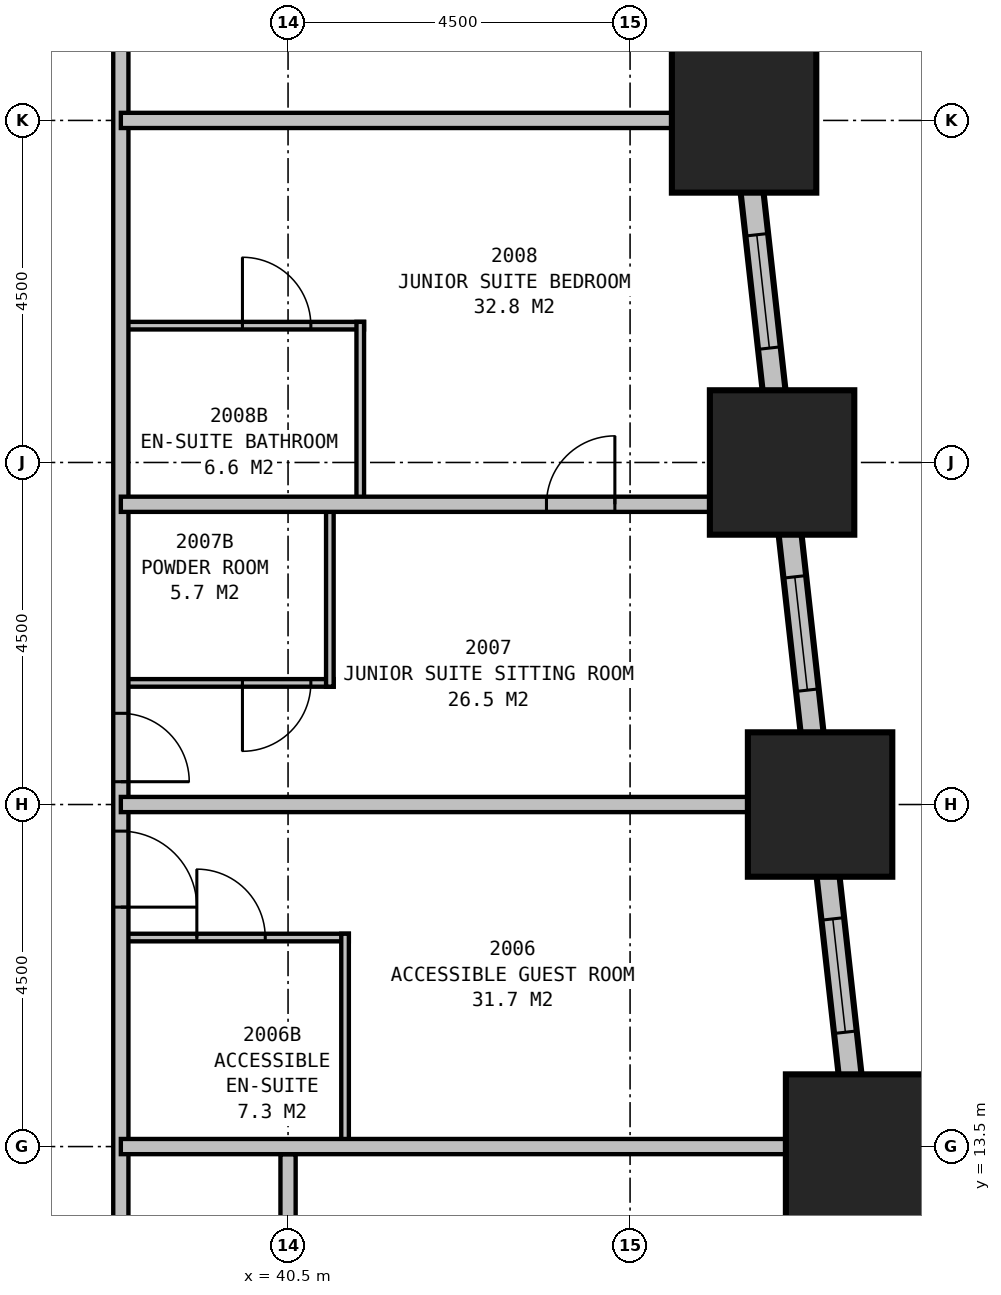
"""IFC4 building model, lengths in metres.
Left out: names, types, materials, properties, quantities, classifications, styles, units other than length and angle.
Written with IfcOpenShell. Run it as: python <this file> out.ifc"""

import sys

from ifc_helpers import new_model, si_unit, direction, frame, frame_2d, origin, origin_2d, place, context, subcontext, project, spatial, rectangle, extrude, element, fill, save


model = new_model("IFC4")
c1 = context("Model", 3, precision=1e-05, world=origin(), true_north=direction((0.0, 1.0)))
c2 = subcontext(c1, "Body", "Model", "MODEL_VIEW")
j1 = project(units=[si_unit("LENGTHUNIT", "METRE"), si_unit("PLANEANGLEUNIT", "RADIAN")], contexts=[c1])
p1 = place(None, origin())
s1 = spatial("IfcSite", under=j1, at=p1, CompositionType="ELEMENT")
p2 = place(p1, origin())
s2 = spatial("IfcBuilding", under=s1, at=p2, CompositionType="ELEMENT")
p3 = place(p2, frame((0.0, 0.0, 82.2)))
s3 = spatial("IfcBuildingStorey", under=s2, at=p3, CompositionType="ELEMENT", Elevation=82.2)
for number, where, z_axis, x_axis in (
    (1, (48.0, 13.5, 0.0), (0.0, 0.0, 1.0), (1.0, 0.0, 0.0)),
    (2, (47.5, 18.0, 0.0), (0.0, 0.0, 1.0), (1.0, 0.0, 0.0)),
    (3, (47.0, 22.5, 0.0), (0.0, 0.0, 1.0), (1.0, 0.0, 0.0)),
    (4, (46.5, 27.0, 0.0), (0.0, 0.0, 1.0), (1.0, 0.0, 0.0)),
):
    element("IfcColumn", number, at=place(p3, frame(where, z_axis=z_axis, x_axis=x_axis)), inside=s3, PredefinedType="COLUMN", context=c2, shape_type="SweptSolid", body=[
        extrude(rectangle(XDim=1.9, YDim=1.9, at=origin_2d()), origin(), (0.0, 0.0, 1.0), 3.5),
    ])
p4 = place(p3, frame((49.017, 4.351, 0.0), z_axis=(0.0, 0.0, 1.0), x_axis=(-0.110433201132, 0.993883548555, 0.0)))
e5 = element("IfcWall", 5, at=p4, inside=s3, PredefinedType="STANDARD", context=c2, shape_type="SweptSolid", body=[
    extrude(rectangle(XDim=31.994, YDim=0.3, at=frame_2d((15.997, 0.0))), origin(), (0.0, 0.0, 1.0), 2.1),
])
p5 = place(p4, frame((1.664, 0.0, 0.5)))
e6 = element("IfcOpeningElement", 6, at=p5, cuts=e5, PredefinedType="OPENING", context=c2, shape_type="SweptSolid", body=[
    extrude(rectangle(XDim=1.5, YDim=1.4, at=frame_2d((0.75, 0.7))), frame((0.0, 0.16, 0.0), z_axis=(0.0, -1.0, 0.0), x_axis=(1.0, 0.0, 0.0)), (0.0, 0.0, 1.0), 0.32),
])
p6 = place(p4, frame((6.192, 0.0, 0.5)))
e7 = element("IfcOpeningElement", 7, at=p6, cuts=e5, PredefinedType="OPENING", context=c2, shape_type="SweptSolid", body=[
    extrude(rectangle(XDim=1.5, YDim=1.4, at=frame_2d((0.75, 0.7))), frame((0.0, 0.16, 0.0), z_axis=(0.0, -1.0, 0.0), x_axis=(1.0, 0.0, 0.0)), (0.0, 0.0, 1.0), 0.32),
])
p7 = place(p4, frame((10.719, 0.0, 0.5)))
e8 = element("IfcOpeningElement", 8, at=p7, cuts=e5, PredefinedType="OPENING", context=c2, shape_type="SweptSolid", body=[
    extrude(rectangle(XDim=1.5, YDim=1.4, at=frame_2d((0.75, 0.7))), frame((0.0, 0.16, 0.0), z_axis=(0.0, -1.0, 0.0), x_axis=(1.0, 0.0, 0.0)), (0.0, 0.0, 1.0), 0.32),
])
p8 = place(p4, frame((15.247, 0.0, 0.5)))
e9 = element("IfcOpeningElement", 9, at=p8, cuts=e5, PredefinedType="OPENING", context=c2, shape_type="SweptSolid", body=[
    extrude(rectangle(XDim=1.5, YDim=1.4, at=frame_2d((0.75, 0.7))), frame((0.0, 0.16, 0.0), z_axis=(0.0, -1.0, 0.0), x_axis=(1.0, 0.0, 0.0)), (0.0, 0.0, 1.0), 0.32),
])
p9 = place(p4, frame((19.775, 0.0, 0.5)))
e10 = element("IfcOpeningElement", 10, at=p9, cuts=e5, PredefinedType="OPENING", context=c2, shape_type="SweptSolid", body=[
    extrude(rectangle(XDim=1.5, YDim=1.4, at=frame_2d((0.75, 0.7))), frame((0.0, 0.16, 0.0), z_axis=(0.0, -1.0, 0.0), x_axis=(1.0, 0.0, 0.0)), (0.0, 0.0, 1.0), 0.32),
])
p10 = place(p4, frame((24.302, 0.0, 0.5)))
e11 = element("IfcOpeningElement", 11, at=p10, cuts=e5, PredefinedType="OPENING", context=c2, shape_type="SweptSolid", body=[
    extrude(rectangle(XDim=1.5, YDim=1.4, at=frame_2d((0.75, 0.7))), frame((0.0, 0.16, 0.0), z_axis=(0.0, -1.0, 0.0), x_axis=(1.0, 0.0, 0.0)), (0.0, 0.0, 1.0), 0.32),
])
p11 = place(p4, frame((28.83, 0.0, 0.5)))
e12 = element("IfcOpeningElement", 12, at=p11, cuts=e5, PredefinedType="OPENING", context=c2, shape_type="SweptSolid", body=[
    extrude(rectangle(XDim=1.5, YDim=1.4, at=frame_2d((0.75, 0.7))), frame((0.0, 0.16, 0.0), z_axis=(0.0, -1.0, 0.0), x_axis=(1.0, 0.0, 0.0)), (0.0, 0.0, 1.0), 0.32),
])
p12 = place(p3, frame((38.3, 11.2, 0.0), z_axis=(0.0, 0.0, 1.0), x_axis=(0.0, 1.0, 0.0)))
e13 = element("IfcWall", 13, at=p12, inside=s3, PredefinedType="PARTITIONING", context=c2, shape_type="SweptSolid", body=[
    extrude(rectangle(XDim=18.7, YDim=0.2, at=frame_2d((9.35, 0.0))), origin(), (0.0, 0.0, 1.0), 3.25),
])
p13 = place(p12, frame((6.45, 0.0, 0.0), z_axis=(0.0, 0.0, 1.0), x_axis=(-1.0, 0.0, 0.0)))
e14 = element("IfcOpeningElement", 14, at=p13, cuts=e13, PredefinedType="OPENING", context=c2, shape_type="SweptSolid", body=[
    extrude(rectangle(XDim=1.0, YDim=2.1, at=frame_2d((0.5, 1.05))), frame((0.0, 0.11, 0.0), z_axis=(0.0, -1.0, 0.0), x_axis=(1.0, 0.0, 0.0)), (0.0, 0.0, 1.0), 0.22),
])
p14 = place(p12, frame((8.0, 0.0, 0.0), z_axis=(0.0, 0.0, 1.0), x_axis=(-1.0, 0.0, 0.0)))
e15 = element("IfcOpeningElement", 15, at=p14, cuts=e13, PredefinedType="OPENING", context=c2, shape_type="SweptSolid", body=[
    extrude(rectangle(XDim=0.9, YDim=2.1, at=frame_2d((0.45, 1.05))), frame((0.0, 0.11, 0.0), z_axis=(0.0, -1.0, 0.0), x_axis=(1.0, 0.0, 0.0)), (0.0, 0.0, 1.0), 0.22),
])
p15 = place(p3, frame((38.3, 18.0, 0.0), z_axis=(0.0, 0.0, 1.0), x_axis=(1.0, 0.0, 0.0)))
e16 = element("IfcWall", 16, at=p15, inside=s3, PredefinedType="PARTITIONING", context=c2, shape_type="SweptSolid", body=[
    extrude(rectangle(XDim=9.199, YDim=0.2, at=frame_2d((4.6, 0.0))), origin(), (0.0, 0.0, 1.0), 2.2),
])
p16 = place(p3, frame((38.3, 21.95, 0.0), z_axis=(0.0, 0.0, 1.0), x_axis=(1.0, 0.0, 0.0)))
e17 = element("IfcWall", 17, at=p16, inside=s3, PredefinedType="PARTITIONING", context=c2, shape_type="SweptSolid", body=[
    extrude(rectangle(XDim=8.76, YDim=0.2, at=frame_2d((4.38, 0.0))), origin(), (0.0, 0.0, 1.0), 3.25),
])
p17 = place(p16, frame((5.6, 0.0, 0.0)))
e18 = element("IfcOpeningElement", 18, at=p17, cuts=e17, PredefinedType="OPENING", context=c2, shape_type="SweptSolid", body=[
    extrude(rectangle(XDim=0.9, YDim=2.1, at=frame_2d((0.45, 1.05))), frame((0.0, 0.11, 0.0), z_axis=(0.0, -1.0, 0.0), x_axis=(1.0, 0.0, 0.0)), (0.0, 0.0, 1.0), 0.22),
])
p18 = place(p3, frame((41.25, 13.5, 0.0), z_axis=(0.0, 0.0, 1.0), x_axis=(0.0, 1.0, 0.0)))
e19 = element("IfcWall", 19, at=p18, inside=s3, PredefinedType="PLUMBINGWALL", context=c2, shape_type="SweptSolid", body=[
    extrude(rectangle(XDim=2.8, YDim=0.1, at=frame_2d((1.4, 0.0))), origin(), (0.0, 0.0, 1.0), 3.25),
])
p19 = place(p3, frame((38.3, 16.25, 0.0), z_axis=(0.0, 0.0, 1.0), x_axis=(1.0, 0.0, 0.0)))
e20 = element("IfcWall", 20, at=p19, inside=s3, PredefinedType="PLUMBINGWALL", context=c2, shape_type="SweptSolid", body=[
    extrude(rectangle(XDim=3.0, YDim=0.1, at=frame_2d((1.5, 0.0))), origin(), (0.0, 0.0, 1.0), 3.25),
])
p20 = place(p19, frame((1.0, 0.0, 0.0)))
e21 = element("IfcOpeningElement", 21, at=p20, cuts=e20, PredefinedType="OPENING", context=c2, shape_type="SweptSolid", body=[
    extrude(rectangle(XDim=0.9, YDim=2.1, at=frame_2d((0.45, 1.05))), frame((0.0, 0.06, 0.0), z_axis=(0.0, -1.0, 0.0), x_axis=(1.0, 0.0, 0.0)), (0.0, 0.0, 1.0), 0.12),
])
p21 = place(p3, frame((41.05, 19.55, 0.0), z_axis=(0.0, 0.0, 1.0), x_axis=(0.0, 1.0, 0.0)))
e22 = element("IfcWall", 22, at=p21, inside=s3, PredefinedType="PLUMBINGWALL", context=c2, shape_type="SweptSolid", body=[
    extrude(rectangle(XDim=2.4, YDim=0.1, at=frame_2d((1.2, 0.0))), origin(), (0.0, 0.0, 1.0), 3.25),
])
p22 = place(p3, frame((38.3, 19.6, 0.0), z_axis=(0.0, 0.0, 1.0), x_axis=(1.0, 0.0, 0.0)))
e23 = element("IfcWall", 23, at=p22, inside=s3, PredefinedType="PLUMBINGWALL", context=c2, shape_type="SweptSolid", body=[
    extrude(rectangle(XDim=2.8, YDim=0.1, at=frame_2d((1.4, 0.0))), origin(), (0.0, 0.0, 1.0), 3.25),
])
p23 = place(p22, frame((2.5, 0.0, 0.0), z_axis=(0.0, 0.0, 1.0), x_axis=(-1.0, 0.0, 0.0)))
e24 = element("IfcOpeningElement", 24, at=p23, cuts=e23, PredefinedType="OPENING", context=c2, shape_type="SweptSolid", body=[
    extrude(rectangle(XDim=0.9, YDim=2.1, at=frame_2d((0.45, 1.05))), frame((0.0, 0.06, 0.0), z_axis=(0.0, -1.0, 0.0), x_axis=(1.0, 0.0, 0.0)), (0.0, 0.0, 1.0), 0.12),
])
p24 = place(p3, frame((41.45, 21.95, 0.0), z_axis=(0.0, 0.0, 1.0), x_axis=(0.0, 1.0, 0.0)))
e25 = element("IfcWall", 25, at=p24, inside=s3, PredefinedType="PLUMBINGWALL", context=c2, shape_type="SweptSolid", body=[
    extrude(rectangle(XDim=2.4, YDim=0.1, at=frame_2d((1.2, 0.0))), origin(), (0.0, 0.0, 1.0), 3.25),
])
p25 = place(p3, frame((38.3, 24.3, 0.0), z_axis=(0.0, 0.0, 1.0), x_axis=(1.0, 0.0, 0.0)))
e26 = element("IfcWall", 26, at=p25, inside=s3, PredefinedType="PLUMBINGWALL", context=c2, shape_type="SweptSolid", body=[
    extrude(rectangle(XDim=3.2, YDim=0.1, at=frame_2d((1.6, 0.0))), origin(), (0.0, 0.0, 1.0), 3.25),
])
p26 = place(p25, frame((1.6, 0.0, 0.0)))
e27 = element("IfcOpeningElement", 27, at=p26, cuts=e26, PredefinedType="OPENING", context=c2, shape_type="SweptSolid", body=[
    extrude(rectangle(XDim=0.9, YDim=2.1, at=frame_2d((0.45, 1.05))), frame((0.0, 0.06, 0.0), z_axis=(0.0, -1.0, 0.0), x_axis=(1.0, 0.0, 0.0)), (0.0, 0.0, 1.0), 0.12),
])
p27 = place(p3, frame((38.3, 13.5, 0.0), z_axis=(0.0, 0.0, 1.0), x_axis=(1.0, 0.0, 0.0)))
e28 = element("IfcWall", 28, at=p27, inside=s3, PredefinedType="PARTITIONING", context=c2, shape_type="SweptSolid", body=[
    extrude(rectangle(XDim=9.921, YDim=0.2, at=frame_2d((4.96, 0.0))), origin(), (0.0, 0.0, 1.0), 1.9),
])
p28 = place(p3, frame((40.5, 4.6, 0.0), z_axis=(0.0, 0.0, 1.0), x_axis=(0.0, 1.0, 0.0)))
e29 = element("IfcWall", 29, at=p28, inside=s3, PredefinedType="PARTITIONING", context=c2, shape_type="SweptSolid", body=[
    extrude(rectangle(XDim=8.8, YDim=0.2, at=frame_2d((4.4, 0.0))), origin(), (0.0, 0.0, 1.0), 2.2),
])
p29 = place(p28, frame((4.05, 0.0, 0.0)))
e30 = element("IfcOpeningElement", 30, at=p29, cuts=e29, PredefinedType="OPENING", context=c2, shape_type="SweptSolid", body=[
    extrude(rectangle(XDim=0.9, YDim=2.1, at=frame_2d((0.45, 1.05))), frame((0.0, 0.11, 0.0), z_axis=(0.0, -1.0, 0.0), x_axis=(1.0, 0.0, 0.0)), (0.0, 0.0, 1.0), 0.22),
])
p30 = place(p3, frame((38.3, 27.0, 0.0), z_axis=(0.0, 0.0, 1.0), x_axis=(1.0, 0.0, 0.0)))
e31 = element("IfcWall", 31, at=p30, inside=s3, PredefinedType="PARTITIONING", context=c2, shape_type="SweptSolid", body=[
    extrude(rectangle(XDim=7.977, YDim=0.2, at=frame_2d((3.988, 0.0))), origin(), (0.0, 0.0, 1.0), 1.9),
])
p31 = place(p7, origin())
e32 = element("IfcWindow", 32, at=p31, inside=s3, PartitioningType="SINGLE_PANEL", PredefinedType="WINDOW", context=c2, shape_type="SweptSolid", body=[
    extrude(rectangle(XDim=1.5, YDim=1.4, at=frame_2d((0.75, 0.7))), frame((0.0, 0.03, 0.0), z_axis=(0.0, -1.0, 0.0), x_axis=(1.0, 0.0, 0.0)), (0.0, 0.0, 1.0), 0.06),
])
fill(e8, e32)
p32 = place(p8, origin())
e33 = element("IfcWindow", 33, at=p32, inside=s3, PartitioningType="SINGLE_PANEL", PredefinedType="WINDOW", context=c2, shape_type="SweptSolid", body=[
    extrude(rectangle(XDim=1.5, YDim=1.4, at=frame_2d((0.75, 0.7))), frame((0.0, 0.03, 0.0), z_axis=(0.0, -1.0, 0.0), x_axis=(1.0, 0.0, 0.0)), (0.0, 0.0, 1.0), 0.06),
])
fill(e9, e33)
p33 = place(p9, origin())
e34 = element("IfcWindow", 34, at=p33, inside=s3, PartitioningType="SINGLE_PANEL", PredefinedType="WINDOW", context=c2, shape_type="SweptSolid", body=[
    extrude(rectangle(XDim=1.5, YDim=1.4, at=frame_2d((0.75, 0.7))), frame((0.0, 0.03, 0.0), z_axis=(0.0, -1.0, 0.0), x_axis=(1.0, 0.0, 0.0)), (0.0, 0.0, 1.0), 0.06),
])
fill(e10, e34)
p34 = place(p13, origin())
e35 = element("IfcDoor", 35, at=p34, inside=s3, OperationType="SINGLE_SWING_RIGHT", PredefinedType="DOOR", context=c2, shape_type="SweptSolid", body=[
    extrude(rectangle(XDim=1.0, YDim=2.1, at=frame_2d((0.5, 1.05))), frame((0.0, 0.025, 0.0), z_axis=(0.0, -1.0, 0.0), x_axis=(1.0, 0.0, 0.0)), (0.0, 0.0, 1.0), 0.05),
])
fill(e14, e35)
p35 = place(p14, origin())
e36 = element("IfcDoor", 36, at=p35, inside=s3, OperationType="SINGLE_SWING_RIGHT", PredefinedType="DOOR", context=c2, shape_type="SweptSolid", body=[
    extrude(rectangle(XDim=0.9, YDim=2.1, at=frame_2d((0.45, 1.05))), frame((0.0, 0.025, 0.0), z_axis=(0.0, -1.0, 0.0), x_axis=(1.0, 0.0, 0.0)), (0.0, 0.0, 1.0), 0.05),
])
fill(e15, e36)
p36 = place(p17, origin())
e37 = element("IfcDoor", 37, at=p36, inside=s3, OperationType="SINGLE_SWING_RIGHT", PredefinedType="DOOR", context=c2, shape_type="SweptSolid", body=[
    extrude(rectangle(XDim=0.9, YDim=2.1, at=frame_2d((0.45, 1.05))), frame((0.0, 0.025, 0.0), z_axis=(0.0, -1.0, 0.0), x_axis=(1.0, 0.0, 0.0)), (0.0, 0.0, 1.0), 0.05),
])
fill(e18, e37)
p37 = place(p20, origin())
e38 = element("IfcDoor", 38, at=p37, inside=s3, OperationType="SINGLE_SWING_LEFT", PredefinedType="DOOR", context=c2, shape_type="SweptSolid", body=[
    extrude(rectangle(XDim=0.9, YDim=2.1, at=frame_2d((0.45, 1.05))), frame((0.0, 0.025, 0.0), z_axis=(0.0, -1.0, 0.0), x_axis=(1.0, 0.0, 0.0)), (0.0, 0.0, 1.0), 0.05),
])
fill(e21, e38)
p38 = place(p23, origin())
e39 = element("IfcDoor", 39, at=p38, inside=s3, OperationType="SINGLE_SWING_RIGHT", PredefinedType="DOOR", context=c2, shape_type="SweptSolid", body=[
    extrude(rectangle(XDim=0.9, YDim=2.1, at=frame_2d((0.45, 1.05))), frame((0.0, 0.025, 0.0), z_axis=(0.0, -1.0, 0.0), x_axis=(1.0, 0.0, 0.0)), (0.0, 0.0, 1.0), 0.05),
])
fill(e24, e39)
p39 = place(p26, origin())
e40 = element("IfcDoor", 40, at=p39, inside=s3, OperationType="SINGLE_SWING_LEFT", PredefinedType="DOOR", context=c2, shape_type="SweptSolid", body=[
    extrude(rectangle(XDim=0.9, YDim=2.1, at=frame_2d((0.45, 1.05))), frame((0.0, 0.025, 0.0), z_axis=(0.0, -1.0, 0.0), x_axis=(1.0, 0.0, 0.0)), (0.0, 0.0, 1.0), 0.05),
])
fill(e27, e40)
save(model, sys.argv[1])
